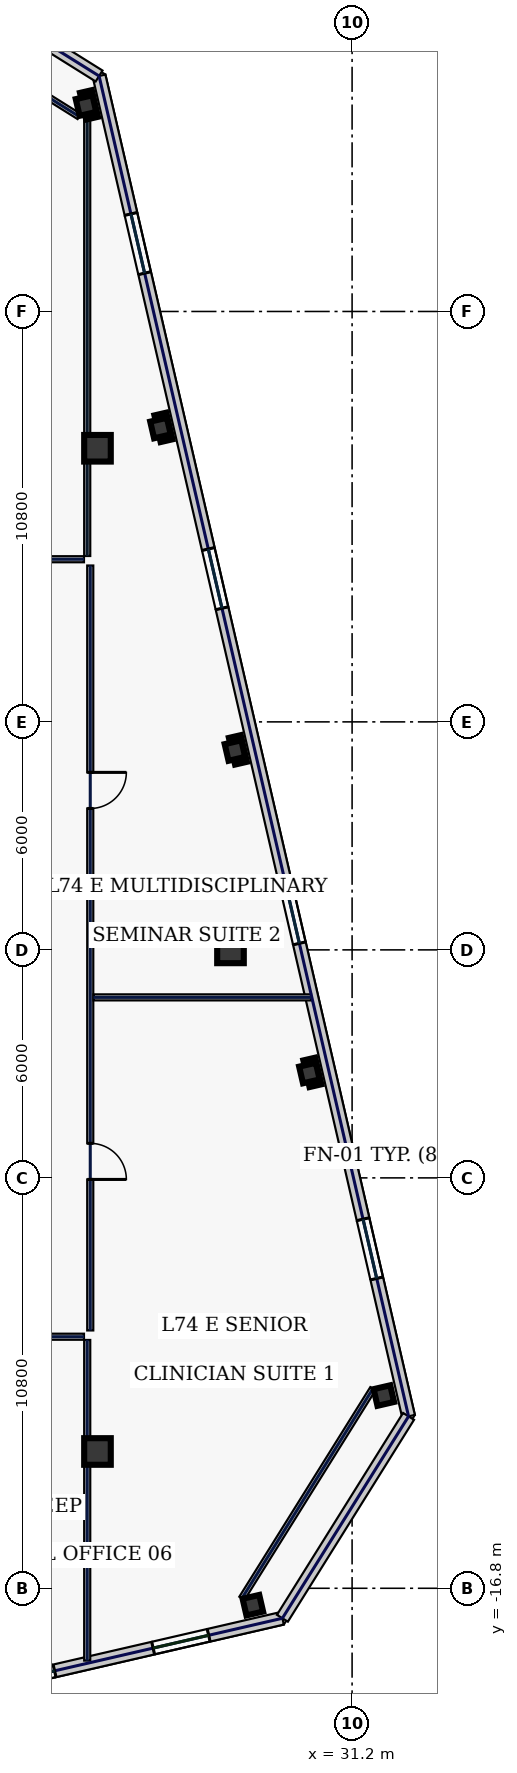
"""IFC4 building model, lengths in metres.
Left out: names, types, materials, properties, quantities, classifications, styles, units other than length and angle.
Written with IfcOpenShell. Run it as: python <this file> out.ifc"""

import sys

from ifc_helpers import new_model, si_unit, direction, frame, frame_2d, origin, origin_2d, place, context, subcontext, project, spatial, rectangle, hollow_rectangle, extrude, element, fill, save


model = new_model("IFC4")
c1 = context("Model", 3, precision=1e-05, world=origin(), true_north=direction((0.0, 1.0)))
c2 = subcontext(c1, "Body", "Model", "MODEL_VIEW")
j1 = project(units=[si_unit("LENGTHUNIT", "METRE"), si_unit("PLANEANGLEUNIT", "RADIAN")], contexts=[c1])
p1 = place(None, origin())
s1 = spatial("IfcSite", under=j1, at=p1, CompositionType="ELEMENT")
p2 = place(p1, origin())
s2 = spatial("IfcBuilding", under=s1, at=p2, CompositionType="ELEMENT")
p3 = place(p2, frame((0.0, 0.0, 317.0)))
s3 = spatial("IfcBuildingStorey", under=s2, at=p3, CompositionType="ELEMENT", Elevation=317.0)
for number, where, z_axis, x_axis in (
    (1, (24.5, -13.2, 0.0), (0.0, 0.0, 1.0), (1.0, 0.0, 0.0)),
    (2, (24.5, 13.2, 0.0), (0.0, 0.0, 1.0), (1.0, 0.0, 0.0)),
    (3, (28.0, 0.0, 0.0), (0.0, 0.0, 1.0), (1.0, 0.0, 0.0)),
):
    element("IfcColumn", number, at=place(p3, frame(where, z_axis=z_axis, x_axis=x_axis)), inside=s3, PredefinedType="COLUMN", context=c2, shape_type="SweptSolid", body=[
        extrude(hollow_rectangle(XDim=0.7, YDim=0.7, WallThickness=0.032, at=origin_2d()), origin(), (0.0, 0.0, 1.0), 3.74),
    ])
for number, where, z_axis, x_axis in (
    (4, (28.589, -17.245, 0.0), (0.0, 0.0, 1.0), (0.974, 0.225, 0.0)),
    (5, (32.036, -11.728, 0.0), (0.0, 0.0, 1.0), (0.974, 0.225, 0.0)),
    (6, (30.077, -3.241, 0.0), (0.0, 0.0, 1.0), (0.974, 0.225, 0.0)),
    (7, (28.117, 5.246, 0.0), (0.0, 0.0, 1.0), (0.974, 0.225, 0.0)),
    (8, (26.158, 13.732, 0.0), (0.0, 0.0, 1.0), (0.974, 0.225, 0.0)),
    (9, (24.198, 22.219, 0.0), (0.0, 0.0, 1.0), (0.974, 0.225, 0.0)),
):
    element("IfcColumn", number, at=place(p3, frame(where, z_axis=z_axis, x_axis=x_axis)), inside=s3, PredefinedType="COLUMN", context=c2, shape_type="SweptSolid", body=[
        extrude(hollow_rectangle(XDim=0.45, YDim=0.45, WallThickness=0.022, at=origin_2d()), origin(), (0.0, 0.0, 1.0), 3.74),
    ])
p4 = place(p3, frame((12.445, -21.495, 0.0), z_axis=(0.0, 0.0, 1.0), x_axis=(0.974369392164, 0.224953967767, 0.0)))
e10 = element("IfcWall", 10, at=p4, inside=s3, PredefinedType="STANDARD", context=c2, shape_type="SweptSolid", body=[
    extrude(rectangle(XDim=17.366, YDim=0.34, at=frame_2d((8.683, 0.0))), origin(), (0.0, 0.0, 1.0), 3.74),
])
p5 = place(p4, frame((2.729, 0.0, 0.9)))
e11 = element("IfcOpeningElement", 11, at=p5, cuts=e10, PredefinedType="OPENING", context=c2, shape_type="SweptSolid", body=[
    extrude(rectangle(XDim=1.5, YDim=2.0, at=frame_2d((0.75, 1.0))), frame((0.0, 0.18, 0.0), z_axis=(0.0, -1.0, 0.0), x_axis=(1.0, 0.0, 0.0)), (0.0, 0.0, 1.0), 0.36),
])
p6 = place(p4, frame((10.363, 0.0, 0.9)))
e12 = element("IfcOpeningElement", 12, at=p6, cuts=e10, PredefinedType="OPENING", context=c2, shape_type="SweptSolid", body=[
    extrude(rectangle(XDim=0.85, YDim=1.85, at=frame_2d((0.425, 0.925))), frame((0.0, 0.18, 0.0), z_axis=(0.0, -1.0, 0.0), x_axis=(1.0, 0.0, 0.0)), (0.0, 0.0, 1.0), 0.36),
])
p7 = place(p4, frame((13.875, 0.0, 0.9)))
e13 = element("IfcOpeningElement", 13, at=p7, cuts=e10, PredefinedType="OPENING", context=c2, shape_type="SweptSolid", body=[
    extrude(rectangle(XDim=1.5, YDim=2.0, at=frame_2d((0.75, 1.0))), frame((0.0, 0.18, 0.0), z_axis=(0.0, -1.0, 0.0), x_axis=(1.0, 0.0, 0.0)), (0.0, 0.0, 1.0), 0.36),
])
p8 = place(p3, frame((32.686, -12.276, 0.0), z_axis=(0.0, 0.0, 1.0), x_axis=(-0.224953091034, 0.974369594576, 0.0)))
e14 = element("IfcWall", 14, at=p8, inside=s3, PredefinedType="STANDARD", context=c2, shape_type="SweptSolid", body=[
    extrude(rectangle(XDim=36.2, YDim=0.34, at=frame_2d((18.1, 0.0))), origin(), (0.0, 0.0, 1.0), 3.74),
])
p9 = place(p8, frame((3.725, 0.0, 0.58)))
e15 = element("IfcOpeningElement", 15, at=p9, cuts=e14, PredefinedType="OPENING", context=c2, shape_type="SweptSolid", body=[
    extrude(rectangle(XDim=1.6, YDim=2.3, at=frame_2d((0.8, 1.15))), frame((0.0, 0.18, 0.0), z_axis=(0.0, -1.0, 0.0), x_axis=(1.0, 0.0, 0.0)), (0.0, 0.0, 1.0), 0.36),
])
p10 = place(p8, frame((12.775, 0.0, 0.58)))
e16 = element("IfcOpeningElement", 16, at=p10, cuts=e14, PredefinedType="OPENING", context=c2, shape_type="SweptSolid", body=[
    extrude(rectangle(XDim=1.6, YDim=2.3, at=frame_2d((0.8, 1.15))), frame((0.0, 0.18, 0.0), z_axis=(0.0, -1.0, 0.0), x_axis=(1.0, 0.0, 0.0)), (0.0, 0.0, 1.0), 0.36),
])
p11 = place(p8, frame((21.825, 0.0, 0.58)))
e17 = element("IfcOpeningElement", 17, at=p11, cuts=e14, PredefinedType="OPENING", context=c2, shape_type="SweptSolid", body=[
    extrude(rectangle(XDim=1.6, YDim=2.3, at=frame_2d((0.8, 1.15))), frame((0.0, 0.18, 0.0), z_axis=(0.0, -1.0, 0.0), x_axis=(1.0, 0.0, 0.0)), (0.0, 0.0, 1.0), 0.36),
])
p12 = place(p8, frame((30.875, 0.0, 0.58)))
e18 = element("IfcOpeningElement", 18, at=p12, cuts=e14, PredefinedType="OPENING", context=c2, shape_type="SweptSolid", body=[
    extrude(rectangle(XDim=1.6, YDim=2.3, at=frame_2d((0.8, 1.15))), frame((0.0, 0.18, 0.0), z_axis=(0.0, -1.0, 0.0), x_axis=(1.0, 0.0, 0.0)), (0.0, 0.0, 1.0), 0.36),
])
for number, where, z_axis, x_axis in (
    (19, (29.366, -17.589, 0.0), (0.0, 0.0, 1.0), (0.53, 0.848, 0.0)),
    (20, (24.542, 22.996, 0.0), (0.0, 0.0, 1.0), (-0.848, 0.53, 0.0)),
):
    element("IfcWall", number, at=place(p3, frame(where, z_axis=z_axis, x_axis=x_axis)), inside=s3, PredefinedType="STANDARD", context=c2, shape_type="SweptSolid", body=[
        extrude(rectangle(XDim=6.265, YDim=0.34, at=frame_2d((3.132, 0.0))), origin(), (0.0, 0.0, 1.0), 3.74),
    ])
for number, where, z_axis, x_axis in (
    (21, (28.3, -17.065, 0.0), (0.0, 0.0, 1.0), (0.53, 0.848, 0.0)),
    (22, (24.018, 21.931, 0.0), (0.0, 0.0, 1.0), (-0.848, 0.53, 0.0)),
):
    element("IfcWall", number, at=place(p3, frame(where, z_axis=z_axis, x_axis=x_axis)), inside=s3, PredefinedType="PARTITIONING", context=c2, shape_type="SweptSolid", body=[
        extrude(rectangle(XDim=6.505, YDim=0.16, at=frame_2d((3.253, 0.0))), origin(), (0.0, 0.0, 1.0), 3.74),
    ])
p13 = place(p3, frame((-24.145, 10.28, 0.0), z_axis=(0.0, 0.0, 1.0), x_axis=(1.0, 0.0, 0.0)))
e23 = element("IfcWall", 23, at=p13, inside=s3, PredefinedType="PARTITIONING", context=c2, shape_type="SweptSolid", body=[
    extrude(rectangle(XDim=48.29, YDim=0.16, at=frame_2d((24.145, 0.0))), origin(), (0.0, 0.0, 1.0), 3.74),
])
p14 = place(p13, frame((3.134, 0.0, 0.0)))
e24 = element("IfcOpeningElement", 24, at=p14, cuts=e23, PredefinedType="OPENING", context=c2, shape_type="SweptSolid", body=[
    extrude(rectangle(XDim=1.05, YDim=2.2, at=frame_2d((0.525, 1.1))), frame((0.0, 0.09, 0.0), z_axis=(0.0, -1.0, 0.0), x_axis=(1.0, 0.0, 0.0)), (0.0, 0.0, 1.0), 0.18),
])
p15 = place(p13, frame((10.657, 0.0, 0.0)))
e25 = element("IfcOpeningElement", 25, at=p15, cuts=e23, PredefinedType="OPENING", context=c2, shape_type="SweptSolid", body=[
    extrude(rectangle(XDim=0.95, YDim=2.2, at=frame_2d((0.475, 1.1))), frame((0.0, 0.09, 0.0), z_axis=(0.0, -1.0, 0.0), x_axis=(1.0, 0.0, 0.0)), (0.0, 0.0, 1.0), 0.18),
])
p16 = place(p13, frame((18.812, 0.0, 0.0)))
e26 = element("IfcOpeningElement", 26, at=p16, cuts=e23, PredefinedType="OPENING", context=c2, shape_type="SweptSolid", body=[
    extrude(rectangle(XDim=0.95, YDim=2.2, at=frame_2d((0.475, 1.1))), frame((0.0, 0.09, 0.0), z_axis=(0.0, -1.0, 0.0), x_axis=(1.0, 0.0, 0.0)), (0.0, 0.0, 1.0), 0.18),
])
p17 = place(p13, frame((27.712, 0.0, 0.0)))
e27 = element("IfcOpeningElement", 27, at=p17, cuts=e23, PredefinedType="OPENING", context=c2, shape_type="SweptSolid", body=[
    extrude(rectangle(XDim=0.95, YDim=2.2, at=frame_2d((0.475, 1.1))), frame((0.0, 0.09, 0.0), z_axis=(0.0, -1.0, 0.0), x_axis=(1.0, 0.0, 0.0)), (0.0, 0.0, 1.0), 0.18),
])
p18 = place(p13, frame((37.357, 0.0, 0.0)))
e28 = element("IfcOpeningElement", 28, at=p18, cuts=e23, PredefinedType="OPENING", context=c2, shape_type="SweptSolid", body=[
    extrude(rectangle(XDim=0.95, YDim=2.2, at=frame_2d((0.475, 1.1))), frame((0.0, 0.09, 0.0), z_axis=(0.0, -1.0, 0.0), x_axis=(1.0, 0.0, 0.0)), (0.0, 0.0, 1.0), 0.18),
])
p19 = place(p13, frame((44.776, 0.0, 0.0)))
e29 = element("IfcOpeningElement", 29, at=p19, cuts=e23, PredefinedType="OPENING", context=c2, shape_type="SweptSolid", body=[
    extrude(rectangle(XDim=1.05, YDim=2.2, at=frame_2d((0.525, 1.1))), frame((0.0, 0.09, 0.0), z_axis=(0.0, -1.0, 0.0), x_axis=(1.0, 0.0, 0.0)), (0.0, 0.0, 1.0), 0.18),
])
p20 = place(p3, frame((24.31, 10.115, 0.0), z_axis=(0.0, 0.0, 1.0), x_axis=(0.0, -1.0, 0.0)))
e30 = element("IfcWall", 30, at=p20, inside=s3, PredefinedType="PARTITIONING", context=c2, shape_type="SweptSolid", body=[
    extrude(rectangle(XDim=20.13, YDim=0.16, at=frame_2d((10.065, 0.0))), origin(), (0.0, 0.0, 1.0), 3.74),
])
p21 = place(p20, frame((15.206, 0.0, 0.0)))
e31 = element("IfcOpeningElement", 31, at=p21, cuts=e30, PredefinedType="OPENING", context=c2, shape_type="SweptSolid", body=[
    extrude(rectangle(XDim=0.95, YDim=2.2, at=frame_2d((0.475, 1.1))), frame((0.0, 0.09, 0.0), z_axis=(0.0, -1.0, 0.0), x_axis=(1.0, 0.0, 0.0)), (0.0, 0.0, 1.0), 0.18),
])
p22 = place(p20, frame((5.444, 0.0, 0.0)))
e32 = element("IfcOpeningElement", 32, at=p22, cuts=e30, PredefinedType="OPENING", context=c2, shape_type="SweptSolid", body=[
    extrude(rectangle(XDim=0.95, YDim=2.2, at=frame_2d((0.475, 1.1))), frame((0.0, 0.09, 0.0), z_axis=(0.0, -1.0, 0.0), x_axis=(1.0, 0.0, 0.0)), (0.0, 0.0, 1.0), 0.18),
])
p23 = place(p3, frame((24.145, -10.18, 0.0), z_axis=(0.0, 0.0, 1.0), x_axis=(-1.0, 0.0, 0.0)))
e33 = element("IfcWall", 33, at=p23, inside=s3, PredefinedType="PARTITIONING", context=c2, shape_type="SweptSolid", body=[
    extrude(rectangle(XDim=9.08, YDim=0.16, at=frame_2d((4.54, 0.0))), origin(), (0.0, 0.0, 1.0), 3.74),
])
p24 = place(p23, frame((2.384, 0.0, 0.0)))
e34 = element("IfcOpeningElement", 34, at=p24, cuts=e33, PredefinedType="OPENING", context=c2, shape_type="SweptSolid", body=[
    extrude(rectangle(XDim=0.95, YDim=2.2, at=frame_2d((0.475, 1.1))), frame((0.0, 0.09, 0.0), z_axis=(0.0, -1.0, 0.0), x_axis=(1.0, 0.0, 0.0)), (0.0, 0.0, 1.0), 0.18),
])
p25 = place(p3, frame((24.23, 10.365, 0.0), z_axis=(0.0, 0.0, 1.0), x_axis=(0.0, 1.0, 0.0)))
e35 = element("IfcWall", 35, at=p25, inside=s3, PredefinedType="PARTITIONING", context=c2, shape_type="SweptSolid", body=[
    extrude(rectangle(XDim=12.206, YDim=0.16, at=frame_2d((6.103, 0.0))), origin(), (0.0, 0.0, 1.0), 3.185),
])
p26 = place(p3, frame((24.23, -18.703, 0.0), z_axis=(0.0, 0.0, 1.0), x_axis=(0.0, 1.0, 0.0)))
e36 = element("IfcWall", 36, at=p26, inside=s3, PredefinedType="PARTITIONING", context=c2, shape_type="SweptSolid", body=[
    extrude(rectangle(XDim=8.438, YDim=0.16, at=frame_2d((4.219, 0.0))), origin(), (0.0, 0.0, 1.0), 3.74),
])
p27 = place(p3, frame((24.395, -1.25, 0.0), z_axis=(0.0, 0.0, 1.0), x_axis=(1.0, 0.0, 0.0)))
e37 = element("IfcWall", 37, at=p27, inside=s3, PredefinedType="PARTITIONING", context=c2, shape_type="SweptSolid", body=[
    extrude(rectangle(XDim=5.725, YDim=0.16, at=frame_2d((2.862, 0.0))), origin(), (0.0, 0.0, 1.0), 3.74),
])
p28 = place(p6, origin())
e38 = element("IfcWindow", 38, at=p28, inside=s3, PartitioningType="SINGLE_PANEL", PredefinedType="WINDOW", context=c2, shape_type="SweptSolid", body=[
    extrude(rectangle(XDim=0.85, YDim=1.85, at=frame_2d((0.425, 0.925))), frame((0.0, 0.03, 0.0), z_axis=(0.0, -1.0, 0.0), x_axis=(1.0, 0.0, 0.0)), (0.0, 0.0, 1.0), 0.06),
])
fill(e12, e38)
p29 = place(p7, origin())
e39 = element("IfcWindow", 39, at=p29, inside=s3, PartitioningType="SINGLE_PANEL", PredefinedType="WINDOW", context=c2, shape_type="SweptSolid", body=[
    extrude(rectangle(XDim=1.5, YDim=2.0, at=frame_2d((0.75, 1.0))), frame((0.0, 0.03, 0.0), z_axis=(0.0, -1.0, 0.0), x_axis=(1.0, 0.0, 0.0)), (0.0, 0.0, 1.0), 0.06),
])
fill(e13, e39)
p30 = place(p9, origin())
e40 = element("IfcWindow", 40, at=p30, inside=s3, PartitioningType="SINGLE_PANEL", PredefinedType="WINDOW", context=c2, shape_type="SweptSolid", body=[
    extrude(rectangle(XDim=1.6, YDim=2.3, at=frame_2d((0.8, 1.15))), frame((0.0, 0.03, 0.0), z_axis=(0.0, -1.0, 0.0), x_axis=(1.0, 0.0, 0.0)), (0.0, 0.0, 1.0), 0.06),
])
fill(e15, e40)
p31 = place(p10, origin())
e41 = element("IfcWindow", 41, at=p31, inside=s3, PartitioningType="SINGLE_PANEL", PredefinedType="WINDOW", context=c2, shape_type="SweptSolid", body=[
    extrude(rectangle(XDim=1.6, YDim=2.3, at=frame_2d((0.8, 1.15))), frame((0.0, 0.03, 0.0), z_axis=(0.0, -1.0, 0.0), x_axis=(1.0, 0.0, 0.0)), (0.0, 0.0, 1.0), 0.06),
])
fill(e16, e41)
p32 = place(p11, origin())
e42 = element("IfcWindow", 42, at=p32, inside=s3, PartitioningType="SINGLE_PANEL", PredefinedType="WINDOW", context=c2, shape_type="SweptSolid", body=[
    extrude(rectangle(XDim=1.6, YDim=2.3, at=frame_2d((0.8, 1.15))), frame((0.0, 0.03, 0.0), z_axis=(0.0, -1.0, 0.0), x_axis=(1.0, 0.0, 0.0)), (0.0, 0.0, 1.0), 0.06),
])
fill(e17, e42)
p33 = place(p12, origin())
e43 = element("IfcWindow", 43, at=p33, inside=s3, PartitioningType="SINGLE_PANEL", PredefinedType="WINDOW", context=c2, shape_type="SweptSolid", body=[
    extrude(rectangle(XDim=1.6, YDim=2.3, at=frame_2d((0.8, 1.15))), frame((0.0, 0.03, 0.0), z_axis=(0.0, -1.0, 0.0), x_axis=(1.0, 0.0, 0.0)), (0.0, 0.0, 1.0), 0.06),
])
fill(e18, e43)
p34 = place(p21, origin())
e44 = element("IfcDoor", 44, at=p34, inside=s3, OperationType="SINGLE_SWING_RIGHT", PredefinedType="DOOR", context=c2, shape_type="SweptSolid", body=[
    extrude(rectangle(XDim=0.95, YDim=2.2, at=frame_2d((0.475, 1.1))), frame((0.0, 0.025, 0.0), z_axis=(0.0, -1.0, 0.0), x_axis=(1.0, 0.0, 0.0)), (0.0, 0.0, 1.0), 0.05),
])
fill(e31, e44)
p35 = place(p22, origin())
e45 = element("IfcDoor", 45, at=p35, inside=s3, OperationType="SINGLE_SWING_LEFT", PredefinedType="DOOR", context=c2, shape_type="SweptSolid", body=[
    extrude(rectangle(XDim=0.95, YDim=2.2, at=frame_2d((0.475, 1.1))), frame((0.0, 0.025, 0.0), z_axis=(0.0, -1.0, 0.0), x_axis=(1.0, 0.0, 0.0)), (0.0, 0.0, 1.0), 0.05),
])
fill(e32, e45)
save(model, sys.argv[1])
